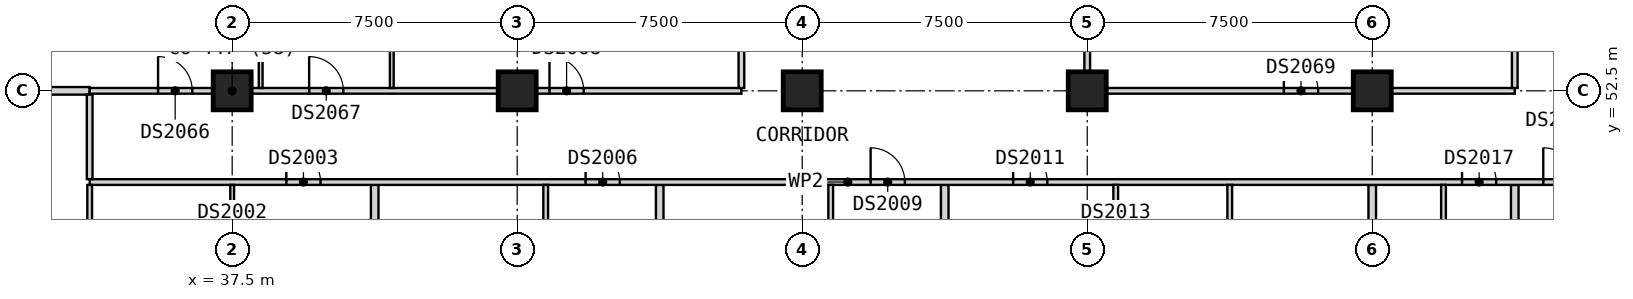
"""IFC4 building model, lengths in metres.
Left out: names, types, materials, properties, quantities, classifications, styles, units other than length and angle.
Written with IfcOpenShell. Run it as: python <this file> out.ifc"""

import sys

from ifc_helpers import new_model, si_unit, direction, frame, frame_2d, origin, origin_2d, place, context, subcontext, project, spatial, rectangle, extrude, element, fill, save


model = new_model("IFC4")
c1 = context("Model", 3, precision=1e-05, world=origin(), true_north=direction((0.0, 1.0)))
c2 = subcontext(c1, "Body", "Model", "MODEL_VIEW")
j1 = project(units=[si_unit("LENGTHUNIT", "METRE"), si_unit("PLANEANGLEUNIT", "RADIAN")], contexts=[c1])
p1 = place(None, origin())
s1 = spatial("IfcSite", under=j1, at=p1, CompositionType="ELEMENT")
p2 = place(p1, origin())
s2 = spatial("IfcBuilding", under=s1, at=p2, CompositionType="ELEMENT")
p3 = place(p2, frame((0.0, 0.0, 133.8)))
s3 = spatial("IfcBuildingStorey", under=s2, at=p3, CompositionType="ELEMENT", Elevation=133.8)
for number, where, z_axis, x_axis in (
    (1, (37.5, 52.5, 0.0), (0.0, 0.0, 1.0), (1.0, 0.0, 0.0)),
    (2, (45.0, 52.5, 0.0), (0.0, 0.0, 1.0), (1.0, 0.0, 0.0)),
    (3, (52.5, 52.5, 0.0), (0.0, 0.0, 1.0), (1.0, 0.0, 0.0)),
    (4, (60.0, 52.5, 0.0), (0.0, 0.0, 1.0), (1.0, 0.0, 0.0)),
    (5, (67.5, 52.5, 0.0), (0.0, 0.0, 1.0), (1.0, 0.0, 0.0)),
):
    element("IfcColumn", number, at=place(p3, frame(where, z_axis=z_axis, x_axis=x_axis)), inside=s3, PredefinedType="COLUMN", context=c2, shape_type="SweptSolid", body=[
        extrude(rectangle(XDim=1.0, YDim=1.0, at=origin_2d()), origin(), (0.0, 0.0, 1.0), 3.6),
    ])
p4 = place(p3, frame((30.0, 52.5, 0.0), z_axis=(0.0, 0.0, 1.0), x_axis=(1.0, 0.0, 0.0)))
e6 = element("IfcWall", 6, at=p4, inside=s3, PredefinedType="PARTITIONING", context=c2, shape_type="SweptSolid", body=[
    extrude(rectangle(XDim=3.75, YDim=0.2, at=frame_2d((1.875, 0.0))), origin(), (0.0, 0.0, 1.0), 3.35),
])
for number, where, z_axis, x_axis in (
    (7, (41.25, 38.31, 0.0), (0.0, 0.0, 1.0), (0.0, 1.0, 0.0)),
    (8, (48.75, 38.31, 0.0), (0.0, 0.0, 1.0), (0.0, 1.0, 0.0)),
    (9, (56.25, 38.31, 0.0), (0.0, 0.0, 1.0), (0.0, 1.0, 0.0)),
):
    element("IfcWall", number, at=place(p3, frame(where, z_axis=z_axis, x_axis=x_axis)), inside=s3, PredefinedType="PARTITIONING", context=c2, shape_type="SweptSolid", body=[
        extrude(rectangle(XDim=11.715, YDim=0.2, at=frame_2d((5.857, 0.0))), origin(), (0.0, 0.0, 1.0), 3.35),
    ])
p5 = place(p3, frame((67.5, 37.5, 0.0), z_axis=(0.0, 0.0, 1.0), x_axis=(0.0, 1.0, 0.0)))
e10 = element("IfcWall", 10, at=p5, inside=s3, PredefinedType="PARTITIONING", context=c2, shape_type="SweptSolid", body=[
    extrude(rectangle(XDim=12.525, YDim=0.2, at=frame_2d((6.262, 0.0))), origin(), (0.0, 0.0, 1.0), 3.35),
])
p6 = place(p3, frame((71.25, 38.31, 0.0), z_axis=(0.0, 0.0, 1.0), x_axis=(0.0, 1.0, 0.0)))
e11 = element("IfcWall", 11, at=p6, inside=s3, PredefinedType="PARTITIONING", context=c2, shape_type="SweptSolid", body=[
    extrude(rectangle(XDim=11.715, YDim=0.2, at=frame_2d((5.857, 0.0))), origin(), (0.0, 0.0, 1.0), 3.35),
])
p7 = place(p3, frame((33.75, 50.1, 0.0), z_axis=(0.0, 0.0, 1.0), x_axis=(1.0, 0.0, 0.0)))
e12 = element("IfcWall", 12, at=p7, inside=s3, PredefinedType="PARTITIONING", context=c2, shape_type="SweptSolid", body=[
    extrude(rectangle(XDim=39.9, YDim=0.15, at=frame_2d((19.95, 0.0))), origin(), (0.0, 0.0, 1.0), 3.35),
])
p8 = place(p7, frame((5.175, 0.0, 0.0)))
e13 = element("IfcOpeningElement", 13, at=p8, cuts=e12, PredefinedType="OPENING", context=c2, shape_type="SweptSolid", body=[
    extrude(rectangle(XDim=0.9, YDim=2.1, at=frame_2d((0.45, 1.05))), frame((0.0, 0.085, 0.0), z_axis=(0.0, -1.0, 0.0), x_axis=(1.0, 0.0, 0.0)), (0.0, 0.0, 1.0), 0.17),
])
p9 = place(p7, frame((13.05, 0.0, 0.0)))
e14 = element("IfcOpeningElement", 14, at=p9, cuts=e12, PredefinedType="OPENING", context=c2, shape_type="SweptSolid", body=[
    extrude(rectangle(XDim=0.9, YDim=2.1, at=frame_2d((0.45, 1.05))), frame((0.0, 0.085, 0.0), z_axis=(0.0, -1.0, 0.0), x_axis=(1.0, 0.0, 0.0)), (0.0, 0.0, 1.0), 0.17),
])
p10 = place(p7, frame((20.55, 0.0, 0.0)))
e15 = element("IfcOpeningElement", 15, at=p10, cuts=e12, PredefinedType="OPENING", context=c2, shape_type="SweptSolid", body=[
    extrude(rectangle(XDim=0.9, YDim=2.1, at=frame_2d((0.45, 1.05))), frame((0.0, 0.085, 0.0), z_axis=(0.0, -1.0, 0.0), x_axis=(1.0, 0.0, 0.0)), (0.0, 0.0, 1.0), 0.17),
])
p11 = place(p7, frame((24.3, 0.0, 0.0)))
e16 = element("IfcOpeningElement", 16, at=p11, cuts=e12, PredefinedType="OPENING", context=c2, shape_type="SweptSolid", body=[
    extrude(rectangle(XDim=0.9, YDim=2.1, at=frame_2d((0.45, 1.05))), frame((0.0, 0.085, 0.0), z_axis=(0.0, -1.0, 0.0), x_axis=(1.0, 0.0, 0.0)), (0.0, 0.0, 1.0), 0.17),
])
p12 = place(p7, frame((36.113, 0.0, 0.0)))
e17 = element("IfcOpeningElement", 17, at=p12, cuts=e12, PredefinedType="OPENING", context=c2, shape_type="SweptSolid", body=[
    extrude(rectangle(XDim=0.9, YDim=2.1, at=frame_2d((0.45, 1.05))), frame((0.0, 0.085, 0.0), z_axis=(0.0, -1.0, 0.0), x_axis=(1.0, 0.0, 0.0)), (0.0, 0.0, 1.0), 0.17),
])
p13 = place(p7, frame((38.25, 0.0, 0.0)))
e18 = element("IfcOpeningElement", 18, at=p13, cuts=e12, PredefinedType="OPENING", context=c2, shape_type="SweptSolid", body=[
    extrude(rectangle(XDim=0.9, YDim=2.1, at=frame_2d((0.45, 1.05))), frame((0.0, 0.085, 0.0), z_axis=(0.0, -1.0, 0.0), x_axis=(1.0, 0.0, 0.0)), (0.0, 0.0, 1.0), 0.17),
])
p14 = place(p3, frame((33.75, 52.5, 0.0), z_axis=(0.0, 0.0, 1.0), x_axis=(1.0, 0.0, 0.0)))
e19 = element("IfcWall", 19, at=p14, inside=s3, PredefinedType="PARTITIONING", context=c2, shape_type="SweptSolid", body=[
    extrude(rectangle(XDim=17.15, YDim=0.15, at=frame_2d((8.575, 0.0))), origin(), (0.0, 0.0, 1.0), 3.35),
])
p15 = place(p14, frame((1.8, 0.0, 0.0)))
e20 = element("IfcOpeningElement", 20, at=p15, cuts=e19, PredefinedType="OPENING", context=c2, shape_type="SweptSolid", body=[
    extrude(rectangle(XDim=0.9, YDim=2.1, at=frame_2d((0.45, 1.05))), frame((0.0, 0.085, 0.0), z_axis=(0.0, -1.0, 0.0), x_axis=(1.0, 0.0, 0.0)), (0.0, 0.0, 1.0), 0.17),
])
p16 = place(p14, frame((5.775, 0.0, 0.0)))
e21 = element("IfcOpeningElement", 21, at=p16, cuts=e19, PredefinedType="OPENING", context=c2, shape_type="SweptSolid", body=[
    extrude(rectangle(XDim=0.9, YDim=2.1, at=frame_2d((0.45, 1.05))), frame((0.0, 0.085, 0.0), z_axis=(0.0, -1.0, 0.0), x_axis=(1.0, 0.0, 0.0)), (0.0, 0.0, 1.0), 0.17),
])
p17 = place(p14, frame((12.1, 0.0, 0.0)))
e22 = element("IfcOpeningElement", 22, at=p17, cuts=e19, PredefinedType="OPENING", context=c2, shape_type="SweptSolid", body=[
    extrude(rectangle(XDim=0.9, YDim=2.1, at=frame_2d((0.45, 1.05))), frame((0.0, 0.085, 0.0), z_axis=(0.0, -1.0, 0.0), x_axis=(1.0, 0.0, 0.0)), (0.0, 0.0, 1.0), 0.17),
])
p18 = place(p3, frame((60.0, 52.5, 0.0), z_axis=(0.0, 0.0, 1.0), x_axis=(1.0, 0.0, 0.0)))
e23 = element("IfcWall", 23, at=p18, inside=s3, PredefinedType="PARTITIONING", context=c2, shape_type="SweptSolid", body=[
    extrude(rectangle(XDim=11.25, YDim=0.15, at=frame_2d((5.625, 0.0))), origin(), (0.0, 0.0, 1.0), 3.35),
])
p19 = place(p18, frame((5.175, 0.0, 0.0)))
e24 = element("IfcOpeningElement", 24, at=p19, cuts=e23, PredefinedType="OPENING", context=c2, shape_type="SweptSolid", body=[
    extrude(rectangle(XDim=0.9, YDim=2.1, at=frame_2d((0.45, 1.05))), frame((0.0, 0.085, 0.0), z_axis=(0.0, -1.0, 0.0), x_axis=(1.0, 0.0, 0.0)), (0.0, 0.0, 1.0), 0.17),
])
p20 = place(p3, frame((33.75, 50.175, 0.0), z_axis=(0.0, 0.0, 1.0), x_axis=(0.0, 1.0, 0.0)))
e25 = element("IfcWall", 25, at=p20, inside=s3, PredefinedType="PARTITIONING", context=c2, shape_type="SweptSolid", body=[
    extrude(rectangle(XDim=2.225, YDim=0.15, at=frame_2d((1.112, 0.0))), origin(), (0.0, 0.0, 1.0), 3.35),
])
p21 = place(p3, frame((71.25, 52.575, 0.0), z_axis=(0.0, 0.0, 1.0), x_axis=(0.0, 1.0, 0.0)))
e26 = element("IfcWall", 26, at=p21, inside=s3, PredefinedType="PARTITIONING", context=c2, shape_type="SweptSolid", body=[
    extrude(rectangle(XDim=11.85, YDim=0.15, at=frame_2d((5.925, 0.0))), origin(), (0.0, 0.0, 1.0), 3.35),
])
p22 = place(p21, frame((9.225, 0.0, 0.0)))
e27 = element("IfcOpeningElement", 27, at=p22, cuts=e26, PredefinedType="OPENING", context=c2, shape_type="SweptSolid", body=[
    extrude(rectangle(XDim=0.9, YDim=2.1, at=frame_2d((0.45, 1.05))), frame((0.0, 0.085, 0.0), z_axis=(0.0, -1.0, 0.0), x_axis=(1.0, 0.0, 0.0)), (0.0, 0.0, 1.0), 0.17),
])
p23 = place(p3, frame((37.5, 45.3, 0.0), z_axis=(0.0, 0.0, 1.0), x_axis=(0.0, 1.0, 0.0)))
e28 = element("IfcWall", 28, at=p23, inside=s3, PredefinedType="PARTITIONING", context=c2, shape_type="SweptSolid", body=[
    extrude(rectangle(XDim=4.725, YDim=0.1, at=frame_2d((2.362, 0.0))), origin(), (0.0, 0.0, 1.0), 3.35),
])
p24 = place(p23, frame((1.925, 0.0, 0.0)))
e29 = element("IfcOpeningElement", 29, at=p24, cuts=e28, PredefinedType="OPENING", context=c2, shape_type="SweptSolid", body=[
    extrude(rectangle(XDim=0.9, YDim=2.1, at=frame_2d((0.45, 1.05))), frame((0.0, 0.06, 0.0), z_axis=(0.0, -1.0, 0.0), x_axis=(1.0, 0.0, 0.0)), (0.0, 0.0, 1.0), 0.12),
])
for number, where, z_axis, x_axis in (
    (30, (38.25, 52.575, 0.0), (0.0, 0.0, 1.0), (0.0, 1.0, 0.0)),
    (31, (41.7, 52.575, 0.0), (0.0, 0.0, 1.0), (0.0, 1.0, 0.0)),
):
    element("IfcWall", number, at=place(p3, frame(where, z_axis=z_axis, x_axis=x_axis)), inside=s3, PredefinedType="PARTITIONING", context=c2, shape_type="SweptSolid", body=[
        extrude(rectangle(XDim=7.425, YDim=0.1, at=frame_2d((3.712, 0.0))), origin(), (0.0, 0.0, 1.0), 3.35),
    ])
for number, where, z_axis, x_axis in (
    (32, (33.75, 45.312, 0.0), (0.0, 0.0, 1.0), (0.0, 1.0, 0.0)),
    (33, (45.75, 45.312, 0.0), (0.0, 0.0, 1.0), (0.0, 1.0, 0.0)),
    (34, (53.25, 45.312, 0.0), (0.0, 0.0, 1.0), (0.0, 1.0, 0.0)),
):
    element("IfcWall", number, at=place(p3, frame(where, z_axis=z_axis, x_axis=x_axis)), inside=s3, PredefinedType="PARTITIONING", context=c2, shape_type="SweptSolid", body=[
        extrude(rectangle(XDim=4.712, YDim=0.125, at=frame_2d((2.356, 0.0))), origin(), (0.0, 0.0, 1.0), 3.35),
    ])
p25 = place(p3, frame((60.75, 45.312, 0.0), z_axis=(0.0, 0.0, 1.0), x_axis=(0.0, 1.0, 0.0)))
e35 = element("IfcWall", 35, at=p25, inside=s3, PredefinedType="PARTITIONING", context=c2, shape_type="SweptSolid", body=[
    extrude(rectangle(XDim=4.712, YDim=0.125, at=frame_2d((2.356, 0.0))), origin(), (0.0, 0.0, 1.0), 3.35),
])
p26 = place(p25, frame((1.913, 0.0, 0.0)))
e36 = element("IfcOpeningElement", 36, at=p26, cuts=e35, PredefinedType="OPENING", context=c2, shape_type="SweptSolid", body=[
    extrude(rectangle(XDim=0.9, YDim=2.1, at=frame_2d((0.45, 1.05))), frame((0.0, 0.073, 0.0), z_axis=(0.0, -1.0, 0.0), x_axis=(1.0, 0.0, 0.0)), (0.0, 0.0, 1.0), 0.145),
])
for number, where, z_axis, x_axis in (
    (37, (63.75, 45.312, 0.0), (0.0, 0.0, 1.0), (0.0, 1.0, 0.0)),
    (38, (69.375, 45.312, 0.0), (0.0, 0.0, 1.0), (0.0, 1.0, 0.0)),
):
    element("IfcWall", number, at=place(p3, frame(where, z_axis=z_axis, x_axis=x_axis)), inside=s3, PredefinedType="PARTITIONING", context=c2, shape_type="SweptSolid", body=[
        extrude(rectangle(XDim=4.712, YDim=0.125, at=frame_2d((2.356, 0.0))), origin(), (0.0, 0.0, 1.0), 3.35),
    ])
for number, where, z_axis, x_axis in (
    (39, (50.9, 52.575, 0.0), (0.0, 0.0, 1.0), (0.0, 1.0, 0.0)),
    (40, (60.0, 52.575, 0.0), (0.0, 0.0, 1.0), (0.0, 1.0, 0.0)),
):
    element("IfcWall", number, at=place(p3, frame(where, z_axis=z_axis, x_axis=x_axis)), inside=s3, PredefinedType="PARTITIONING", context=c2, shape_type="SweptSolid", body=[
        extrude(rectangle(XDim=7.425, YDim=0.15, at=frame_2d((3.712, 0.0))), origin(), (0.0, 0.0, 1.0), 3.35),
    ])
p27 = place(p8, origin())
e41 = element("IfcDoor", 41, at=p27, inside=s3, OperationType="SINGLE_SWING_RIGHT", PredefinedType="DOOR", context=c2, shape_type="SweptSolid", body=[
    extrude(rectangle(XDim=0.9, YDim=2.1, at=frame_2d((0.45, 1.05))), frame((0.0, 0.025, 0.0), z_axis=(0.0, -1.0, 0.0), x_axis=(1.0, 0.0, 0.0)), (0.0, 0.0, 1.0), 0.05),
])
fill(e13, e41)
p28 = place(p9, origin())
e42 = element("IfcDoor", 42, at=p28, inside=s3, OperationType="SINGLE_SWING_RIGHT", PredefinedType="DOOR", context=c2, shape_type="SweptSolid", body=[
    extrude(rectangle(XDim=0.9, YDim=2.1, at=frame_2d((0.45, 1.05))), frame((0.0, 0.025, 0.0), z_axis=(0.0, -1.0, 0.0), x_axis=(1.0, 0.0, 0.0)), (0.0, 0.0, 1.0), 0.05),
])
fill(e14, e42)
p29 = place(p10, origin())
e43 = element("IfcDoor", 43, at=p29, inside=s3, OperationType="SINGLE_SWING_RIGHT", PredefinedType="DOOR", context=c2, shape_type="SweptSolid", body=[
    extrude(rectangle(XDim=0.9, YDim=2.1, at=frame_2d((0.45, 1.05))), frame((0.0, 0.025, 0.0), z_axis=(0.0, -1.0, 0.0), x_axis=(1.0, 0.0, 0.0)), (0.0, 0.0, 1.0), 0.05),
])
fill(e15, e43)
p30 = place(p11, origin())
e44 = element("IfcDoor", 44, at=p30, inside=s3, OperationType="SINGLE_SWING_RIGHT", PredefinedType="DOOR", context=c2, shape_type="SweptSolid", body=[
    extrude(rectangle(XDim=0.9, YDim=2.1, at=frame_2d((0.45, 1.05))), frame((0.0, 0.025, 0.0), z_axis=(0.0, -1.0, 0.0), x_axis=(1.0, 0.0, 0.0)), (0.0, 0.0, 1.0), 0.05),
])
fill(e16, e44)
p31 = place(p12, origin())
e45 = element("IfcDoor", 45, at=p31, inside=s3, OperationType="SINGLE_SWING_RIGHT", PredefinedType="DOOR", context=c2, shape_type="SweptSolid", body=[
    extrude(rectangle(XDim=0.9, YDim=2.1, at=frame_2d((0.45, 1.05))), frame((0.0, 0.025, 0.0), z_axis=(0.0, -1.0, 0.0), x_axis=(1.0, 0.0, 0.0)), (0.0, 0.0, 1.0), 0.05),
])
fill(e17, e45)
p32 = place(p13, origin())
e46 = element("IfcDoor", 46, at=p32, inside=s3, OperationType="SINGLE_SWING_LEFT", PredefinedType="DOOR", context=c2, shape_type="SweptSolid", body=[
    extrude(rectangle(XDim=0.9, YDim=2.1, at=frame_2d((0.45, 1.05))), frame((0.0, 0.025, 0.0), z_axis=(0.0, -1.0, 0.0), x_axis=(1.0, 0.0, 0.0)), (0.0, 0.0, 1.0), 0.05),
])
fill(e18, e46)
p33 = place(p15, origin())
e47 = element("IfcDoor", 47, at=p33, inside=s3, OperationType="SINGLE_SWING_LEFT", PredefinedType="DOOR", context=c2, shape_type="SweptSolid", body=[
    extrude(rectangle(XDim=0.9, YDim=2.1, at=frame_2d((0.45, 1.05))), frame((0.0, 0.025, 0.0), z_axis=(0.0, -1.0, 0.0), x_axis=(1.0, 0.0, 0.0)), (0.0, 0.0, 1.0), 0.05),
])
fill(e20, e47)
p34 = place(p16, origin())
e48 = element("IfcDoor", 48, at=p34, inside=s3, OperationType="SINGLE_SWING_LEFT", PredefinedType="DOOR", context=c2, shape_type="SweptSolid", body=[
    extrude(rectangle(XDim=0.9, YDim=2.1, at=frame_2d((0.45, 1.05))), frame((0.0, 0.025, 0.0), z_axis=(0.0, -1.0, 0.0), x_axis=(1.0, 0.0, 0.0)), (0.0, 0.0, 1.0), 0.05),
])
fill(e21, e48)
p35 = place(p17, origin())
e49 = element("IfcDoor", 49, at=p35, inside=s3, OperationType="SINGLE_SWING_LEFT", PredefinedType="DOOR", context=c2, shape_type="SweptSolid", body=[
    extrude(rectangle(XDim=0.9, YDim=2.1, at=frame_2d((0.45, 1.05))), frame((0.0, 0.025, 0.0), z_axis=(0.0, -1.0, 0.0), x_axis=(1.0, 0.0, 0.0)), (0.0, 0.0, 1.0), 0.05),
])
fill(e22, e49)
p36 = place(p19, origin())
e50 = element("IfcDoor", 50, at=p36, inside=s3, OperationType="SINGLE_SWING_LEFT", PredefinedType="DOOR", context=c2, shape_type="SweptSolid", body=[
    extrude(rectangle(XDim=0.9, YDim=2.1, at=frame_2d((0.45, 1.05))), frame((0.0, 0.025, 0.0), z_axis=(0.0, -1.0, 0.0), x_axis=(1.0, 0.0, 0.0)), (0.0, 0.0, 1.0), 0.05),
])
fill(e24, e50)
save(model, sys.argv[1])
